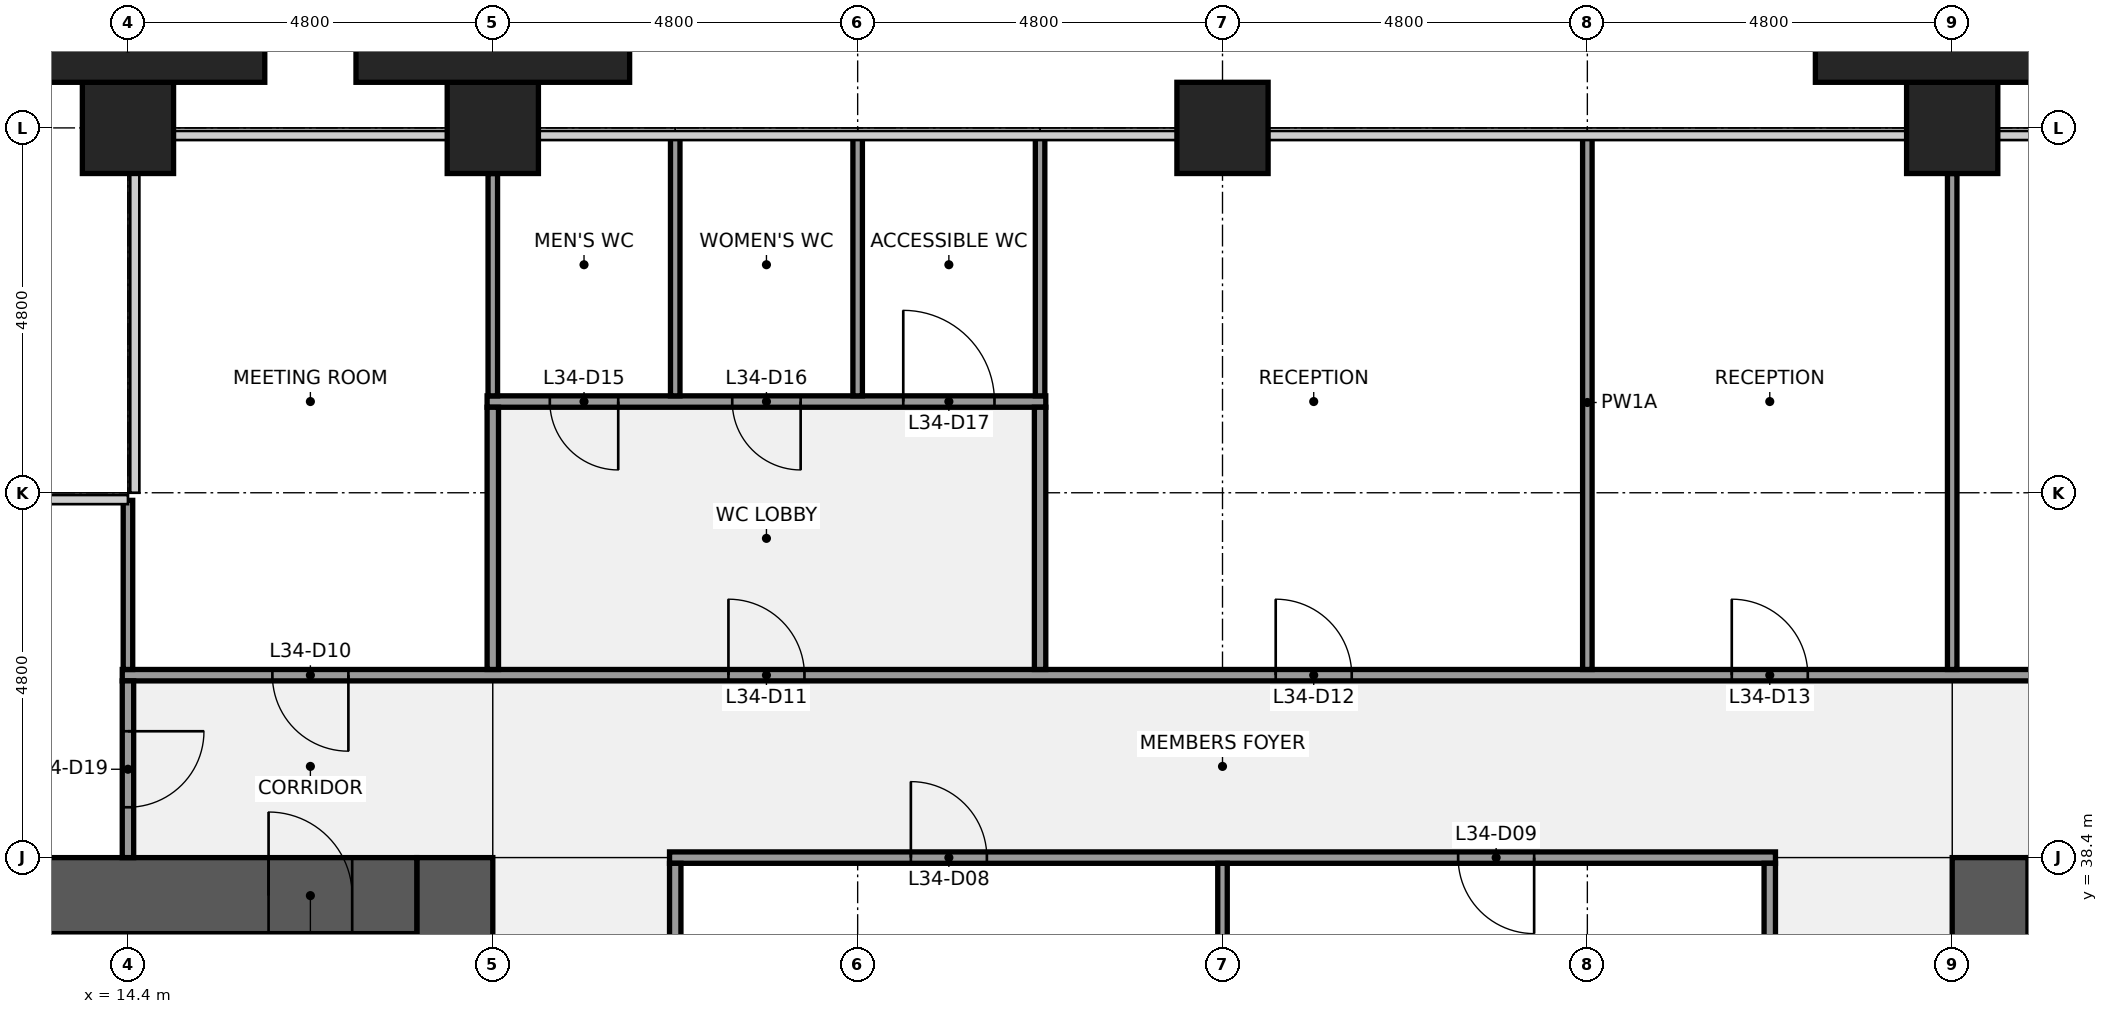
"""IFC4 building model, lengths in metres.
Left out: names, types, materials, properties, quantities, classifications, styles, units other than length and angle.
Written with IfcOpenShell. Run it as: python <this file> out.ifc"""

import sys

from ifc_helpers import new_model, si_unit, direction, frame, frame_2d, origin, origin_2d, place, context, subcontext, project, spatial, rectangle, extrude, element, fill, save


model = new_model("IFC4")
c1 = context("Model", 3, precision=1e-05, world=origin(), true_north=direction((0.0, 1.0)))
c2 = subcontext(c1, "Body", "Model", "MODEL_VIEW")
j1 = project(units=[si_unit("LENGTHUNIT", "METRE"), si_unit("PLANEANGLEUNIT", "RADIAN")], contexts=[c1])
p1 = place(None, origin())
s1 = spatial("IfcSite", under=j1, at=p1, CompositionType="ELEMENT")
p2 = place(p1, origin())
s2 = spatial("IfcBuilding", under=s1, at=p2, CompositionType="ELEMENT")
p3 = place(p2, frame((0.0, 0.0, 156.1)))
s3 = spatial("IfcBuildingStorey", under=s2, at=p3, CompositionType="ELEMENT", Elevation=156.1)
for number, where, z_axis, x_axis in (
    (1, (14.4, 48.0, 0.0), (0.0, 0.0, 1.0), (1.0, 0.0, 0.0)),
    (2, (19.2, 48.0, 0.0), (0.0, 0.0, 1.0), (1.0, 0.0, 0.0)),
    (3, (28.8, 48.0, 0.0), (0.0, 0.0, 1.0), (1.0, 0.0, 0.0)),
    (4, (38.4, 48.0, 0.0), (0.0, 0.0, 1.0), (1.0, 0.0, 0.0)),
):
    element("IfcColumn", number, at=place(p3, frame(where, z_axis=z_axis, x_axis=x_axis)), inside=s3, PredefinedType="COLUMN", context=c2, shape_type="SweptSolid", body=[
        extrude(rectangle(XDim=1.2, YDim=1.2, at=origin_2d()), origin(), (0.0, 0.0, 1.0), 4.0),
    ])
p4 = place(p3, frame((18.7, 38.4, 0.0), z_axis=(0.0, 0.0, 1.0), x_axis=(0.0, -1.0, 0.0)))
e5 = element("IfcWall", 5, at=p4, inside=s3, PredefinedType="SHEAR", context=c2, shape_type="SweptSolid", body=[
    extrude(rectangle(XDim=28.8, YDim=1.0, at=frame_2d((14.4, 0.0))), origin(), (0.0, 0.0, 1.0), 3.84),
])
p5 = place(p4, frame((18.3, 0.0, 0.0)))
e6 = element("IfcOpeningElement", 6, at=p5, cuts=e5, PredefinedType="OPENING", context=c2, shape_type="SweptSolid", body=[
    extrude(rectangle(XDim=1.8, YDim=2.1, at=frame_2d((0.9, 1.05))), frame((0.0, 0.51, 0.0), z_axis=(0.0, -1.0, 0.0), x_axis=(1.0, 0.0, 0.0)), (0.0, 0.0, 1.0), 1.02),
])
p6 = place(p4, frame((8.7, 0.0, 0.0)))
e7 = element("IfcOpeningElement", 7, at=p6, cuts=e5, PredefinedType="OPENING", context=c2, shape_type="SweptSolid", body=[
    extrude(rectangle(XDim=1.8, YDim=2.1, at=frame_2d((0.9, 1.05))), frame((0.0, 0.51, 0.0), z_axis=(0.0, -1.0, 0.0), x_axis=(1.0, 0.0, 0.0)), (0.0, 0.0, 1.0), 1.02),
])
p7 = place(p3, frame((6.25, 37.3, 0.0), z_axis=(0.0, 0.0, 1.0), x_axis=(1.0, 0.0, 0.0)))
e8 = element("IfcWall", 8, at=p7, inside=s3, PredefinedType="SHEAR", context=c2, shape_type="SweptSolid", body=[
    extrude(rectangle(XDim=7.5, YDim=0.2, at=frame_2d((3.75, 0.0))), origin(), (0.0, 0.0, 1.0), 3.84),
])
p8 = place(p3, frame((4.8, 37.9, 0.0), z_axis=(0.0, 0.0, 1.0), x_axis=(1.0, 0.0, 0.0)))
e9 = element("IfcWall", 9, at=p8, inside=s3, PredefinedType="SHEAR", context=c2, shape_type="SweptSolid", body=[
    extrude(rectangle(XDim=13.4, YDim=1.0, at=frame_2d((6.7, 0.0))), origin(), (0.0, 0.0, 1.0), 3.84),
])
p9 = place(p8, frame((11.45, 0.0, 0.0)))
e10 = element("IfcOpeningElement", 10, at=p9, cuts=e9, PredefinedType="OPENING", context=c2, shape_type="SweptSolid", body=[
    extrude(rectangle(XDim=1.1, YDim=2.1, at=frame_2d((0.55, 1.05))), frame((0.0, 0.51, 0.0), z_axis=(0.0, -1.0, 0.0), x_axis=(1.0, 0.0, 0.0)), (0.0, 0.0, 1.0), 1.02),
])
p10 = place(p3, frame((38.9, 9.6, 0.0), z_axis=(0.0, 0.0, 1.0), x_axis=(0.0, 1.0, 0.0)))
e11 = element("IfcWall", 11, at=p10, inside=s3, PredefinedType="SHEAR", context=c2, shape_type="SweptSolid", body=[
    extrude(rectangle(XDim=28.8, YDim=1.0, at=frame_2d((14.4, 0.0))), origin(), (0.0, 0.0, 1.0), 3.84),
])
p11 = place(p10, frame((8.7, 0.0, 0.0)))
e12 = element("IfcOpeningElement", 12, at=p11, cuts=e11, PredefinedType="OPENING", context=c2, shape_type="SweptSolid", body=[
    extrude(rectangle(XDim=1.8, YDim=2.1, at=frame_2d((0.9, 1.05))), frame((0.0, 0.51, 0.0), z_axis=(0.0, -1.0, 0.0), x_axis=(1.0, 0.0, 0.0)), (0.0, 0.0, 1.0), 1.02),
])
p12 = place(p10, frame((18.3, 0.0, 0.0)))
e13 = element("IfcOpeningElement", 13, at=p12, cuts=e11, PredefinedType="OPENING", context=c2, shape_type="SweptSolid", body=[
    extrude(rectangle(XDim=1.8, YDim=2.1, at=frame_2d((0.9, 1.05))), frame((0.0, 0.51, 0.0), z_axis=(0.0, -1.0, 0.0), x_axis=(1.0, 0.0, 0.0)), (0.0, 0.0, 1.0), 1.02),
])
p13 = place(p3, frame((21.525, 38.4, 0.0), z_axis=(0.0, 0.0, 1.0), x_axis=(1.0, 0.0, 0.0)))
e14 = element("IfcWall", 14, at=p13, inside=s3, PredefinedType="PARTITIONING", context=c2, shape_type="SweptSolid", body=[
    extrude(rectangle(XDim=14.55, YDim=0.15, at=frame_2d((7.275, 0.0))), origin(), (0.0, 0.0, 1.0), 2.936),
])
p14 = place(p13, frame((3.175, 0.0, 0.0)))
e15 = element("IfcOpeningElement", 15, at=p14, cuts=e14, PredefinedType="OPENING", context=c2, shape_type="SweptSolid", body=[
    extrude(rectangle(XDim=1.0, YDim=2.1, at=frame_2d((0.5, 1.05))), frame((0.0, 0.085, 0.0), z_axis=(0.0, -1.0, 0.0), x_axis=(1.0, 0.0, 0.0)), (0.0, 0.0, 1.0), 0.17),
])
p15 = place(p13, frame((10.375, 0.0, 0.0)))
e16 = element("IfcOpeningElement", 16, at=p15, cuts=e14, PredefinedType="OPENING", context=c2, shape_type="SweptSolid", body=[
    extrude(rectangle(XDim=1.0, YDim=2.1, at=frame_2d((0.5, 1.05))), frame((0.0, 0.085, 0.0), z_axis=(0.0, -1.0, 0.0), x_axis=(1.0, 0.0, 0.0)), (0.0, 0.0, 1.0), 0.17),
])
p16 = place(p3, frame((14.325, 40.8, 0.0), z_axis=(0.0, 0.0, 1.0), x_axis=(1.0, 0.0, 0.0)))
e17 = element("IfcWall", 17, at=p16, inside=s3, PredefinedType="PARTITIONING", context=c2, shape_type="SweptSolid", body=[
    extrude(rectangle(XDim=28.95, YDim=0.15, at=frame_2d((14.475, 0.0))), origin(), (0.0, 0.0, 1.0), 2.936),
])
p17 = place(p16, frame((1.975, 0.0, 0.0)))
e18 = element("IfcOpeningElement", 18, at=p17, cuts=e17, PredefinedType="OPENING", context=c2, shape_type="SweptSolid", body=[
    extrude(rectangle(XDim=1.0, YDim=2.1, at=frame_2d((0.5, 1.05))), frame((0.0, 0.085, 0.0), z_axis=(0.0, -1.0, 0.0), x_axis=(1.0, 0.0, 0.0)), (0.0, 0.0, 1.0), 0.17),
])
p18 = place(p16, frame((7.975, 0.0, 0.0)))
e19 = element("IfcOpeningElement", 19, at=p18, cuts=e17, PredefinedType="OPENING", context=c2, shape_type="SweptSolid", body=[
    extrude(rectangle(XDim=1.0, YDim=2.1, at=frame_2d((0.5, 1.05))), frame((0.0, 0.085, 0.0), z_axis=(0.0, -1.0, 0.0), x_axis=(1.0, 0.0, 0.0)), (0.0, 0.0, 1.0), 0.17),
])
p19 = place(p16, frame((15.175, 0.0, 0.0)))
e20 = element("IfcOpeningElement", 20, at=p19, cuts=e17, PredefinedType="OPENING", context=c2, shape_type="SweptSolid", body=[
    extrude(rectangle(XDim=1.0, YDim=2.1, at=frame_2d((0.5, 1.05))), frame((0.0, 0.085, 0.0), z_axis=(0.0, -1.0, 0.0), x_axis=(1.0, 0.0, 0.0)), (0.0, 0.0, 1.0), 0.17),
])
p20 = place(p16, frame((21.175, 0.0, 0.0)))
e21 = element("IfcOpeningElement", 21, at=p20, cuts=e17, PredefinedType="OPENING", context=c2, shape_type="SweptSolid", body=[
    extrude(rectangle(XDim=1.0, YDim=2.1, at=frame_2d((0.5, 1.05))), frame((0.0, 0.085, 0.0), z_axis=(0.0, -1.0, 0.0), x_axis=(1.0, 0.0, 0.0)), (0.0, 0.0, 1.0), 0.17),
])
p21 = place(p16, frame((25.975, 0.0, 0.0)))
e22 = element("IfcOpeningElement", 22, at=p21, cuts=e17, PredefinedType="OPENING", context=c2, shape_type="SweptSolid", body=[
    extrude(rectangle(XDim=1.0, YDim=2.1, at=frame_2d((0.5, 1.05))), frame((0.0, 0.085, 0.0), z_axis=(0.0, -1.0, 0.0), x_axis=(1.0, 0.0, 0.0)), (0.0, 0.0, 1.0), 0.17),
])
p22 = place(p3, frame((19.125, 44.4, 0.0), z_axis=(0.0, 0.0, 1.0), x_axis=(1.0, 0.0, 0.0)))
e23 = element("IfcWall", 23, at=p22, inside=s3, PredefinedType="PARTITIONING", context=c2, shape_type="SweptSolid", body=[
    extrude(rectangle(XDim=7.35, YDim=0.15, at=frame_2d((3.675, 0.0))), origin(), (0.0, 0.0, 1.0), 2.936),
])
p23 = place(p22, frame((0.825, 0.0, 0.0)))
e24 = element("IfcOpeningElement", 24, at=p23, cuts=e23, PredefinedType="OPENING", context=c2, shape_type="SweptSolid", body=[
    extrude(rectangle(XDim=0.9, YDim=2.1, at=frame_2d((0.45, 1.05))), frame((0.0, 0.085, 0.0), z_axis=(0.0, -1.0, 0.0), x_axis=(1.0, 0.0, 0.0)), (0.0, 0.0, 1.0), 0.17),
])
p24 = place(p22, frame((3.225, 0.0, 0.0)))
e25 = element("IfcOpeningElement", 25, at=p24, cuts=e23, PredefinedType="OPENING", context=c2, shape_type="SweptSolid", body=[
    extrude(rectangle(XDim=0.9, YDim=2.1, at=frame_2d((0.45, 1.05))), frame((0.0, 0.085, 0.0), z_axis=(0.0, -1.0, 0.0), x_axis=(1.0, 0.0, 0.0)), (0.0, 0.0, 1.0), 0.17),
])
p25 = place(p22, frame((5.475, 0.0, 0.0)))
e26 = element("IfcOpeningElement", 26, at=p25, cuts=e23, PredefinedType="OPENING", context=c2, shape_type="SweptSolid", body=[
    extrude(rectangle(XDim=1.2, YDim=2.1, at=frame_2d((0.6, 1.05))), frame((0.0, 0.085, 0.0), z_axis=(0.0, -1.0, 0.0), x_axis=(1.0, 0.0, 0.0)), (0.0, 0.0, 1.0), 0.17),
])
p26 = place(p3, frame((14.4, 40.875, 0.0), z_axis=(0.0, 0.0, 1.0), x_axis=(0.0, 1.0, 0.0)))
e27 = element("IfcWall", 27, at=p26, inside=s3, PredefinedType="PARTITIONING", context=c2, shape_type="SweptSolid", body=[
    extrude(rectangle(XDim=2.225, YDim=0.125, at=frame_2d((1.113, 0.0))), origin(), (0.0, 0.0, 1.0), 2.936),
])
p27 = place(p3, frame((14.4, 38.4, 0.0), z_axis=(0.0, 0.0, 1.0), x_axis=(0.0, 1.0, 0.0)))
e28 = element("IfcWall", 28, at=p27, inside=s3, PredefinedType="PARTITIONING", context=c2, shape_type="SweptSolid", body=[
    extrude(rectangle(XDim=2.325, YDim=0.15, at=frame_2d((1.163, 0.0))), origin(), (0.0, 0.0, 1.0), 2.936),
])
p28 = place(p27, frame((0.663, 0.0, 0.0)))
e29 = element("IfcOpeningElement", 29, at=p28, cuts=e28, PredefinedType="OPENING", context=c2, shape_type="SweptSolid", body=[
    extrude(rectangle(XDim=1.0, YDim=2.1, at=frame_2d((0.5, 1.05))), frame((0.0, 0.085, 0.0), z_axis=(0.0, -1.0, 0.0), x_axis=(1.0, 0.0, 0.0)), (0.0, 0.0, 1.0), 0.17),
])
p29 = place(p3, frame((19.2, 44.475, 0.0), z_axis=(0.0, 0.0, 1.0), x_axis=(0.0, 1.0, 0.0)))
e30 = element("IfcWall", 30, at=p29, inside=s3, PredefinedType="PARTITIONING", context=c2, shape_type="SweptSolid", body=[
    extrude(rectangle(XDim=2.925, YDim=0.125, at=frame_2d((1.462, 0.0))), origin(), (0.0, 0.0, 1.0), 2.936),
])
p30 = place(p3, frame((19.2, 40.875, 0.0), z_axis=(0.0, 0.0, 1.0), x_axis=(0.0, 1.0, 0.0)))
e31 = element("IfcWall", 31, at=p30, inside=s3, PredefinedType="PARTITIONING", context=c2, shape_type="SweptSolid", body=[
    extrude(rectangle(XDim=3.45, YDim=0.15, at=frame_2d((1.725, 0.0))), origin(), (0.0, 0.0, 1.0), 2.936),
])
p31 = place(p3, frame((21.6, 44.475, 0.0), z_axis=(0.0, 0.0, 1.0), x_axis=(0.0, 1.0, 0.0)))
e32 = element("IfcWall", 32, at=p31, inside=s3, PredefinedType="PARTITIONING", context=c2, shape_type="SweptSolid", body=[
    extrude(rectangle(XDim=3.425, YDim=0.125, at=frame_2d((1.712, 0.0))), origin(), (0.0, 0.0, 1.0), 2.936),
])
p32 = place(p3, frame((21.6, 33.675, 0.0), z_axis=(0.0, 0.0, 1.0), x_axis=(0.0, 1.0, 0.0)))
e33 = element("IfcWall", 33, at=p32, inside=s3, PredefinedType="PARTITIONING", context=c2, shape_type="SweptSolid", body=[
    extrude(rectangle(XDim=4.65, YDim=0.15, at=frame_2d((2.325, 0.0))), origin(), (0.0, 0.0, 1.0), 2.936),
])
for number, where, z_axis, x_axis in (
    (34, (24.0, 44.475, 0.0), (0.0, 0.0, 1.0), (0.0, 1.0, 0.0)),
    (35, (26.4, 44.475, 0.0), (0.0, 0.0, 1.0), (0.0, 1.0, 0.0)),
):
    element("IfcWall", number, at=place(p3, frame(where, z_axis=z_axis, x_axis=x_axis)), inside=s3, PredefinedType="PARTITIONING", context=c2, shape_type="SweptSolid", body=[
        extrude(rectangle(XDim=3.425, YDim=0.125, at=frame_2d((1.712, 0.0))), origin(), (0.0, 0.0, 1.0), 2.936),
    ])
p33 = place(p3, frame((26.4, 40.875, 0.0), z_axis=(0.0, 0.0, 1.0), x_axis=(0.0, 1.0, 0.0)))
e36 = element("IfcWall", 36, at=p33, inside=s3, PredefinedType="PARTITIONING", context=c2, shape_type="SweptSolid", body=[
    extrude(rectangle(XDim=3.45, YDim=0.15, at=frame_2d((1.725, 0.0))), origin(), (0.0, 0.0, 1.0), 2.936),
])
p34 = place(p3, frame((28.8, 33.663, 0.0), z_axis=(0.0, 0.0, 1.0), x_axis=(0.0, 1.0, 0.0)))
e37 = element("IfcWall", 37, at=p34, inside=s3, PredefinedType="PARTITIONING", context=c2, shape_type="SweptSolid", body=[
    extrude(rectangle(XDim=4.662, YDim=0.125, at=frame_2d((2.331, 0.0))), origin(), (0.0, 0.0, 1.0), 2.936),
])
p35 = place(p3, frame((33.6, 40.875, 0.0), z_axis=(0.0, 0.0, 1.0), x_axis=(0.0, 1.0, 0.0)))
e38 = element("IfcWall", 38, at=p35, inside=s3, PredefinedType="PARTITIONING", context=c2, shape_type="SweptSolid", body=[
    extrude(rectangle(XDim=7.025, YDim=0.125, at=frame_2d((3.512, 0.0))), origin(), (0.0, 0.0, 1.0), 2.936),
])
p36 = place(p3, frame((36.0, 33.675, 0.0), z_axis=(0.0, 0.0, 1.0), x_axis=(0.0, 1.0, 0.0)))
e39 = element("IfcWall", 39, at=p36, inside=s3, PredefinedType="PARTITIONING", context=c2, shape_type="SweptSolid", body=[
    extrude(rectangle(XDim=4.65, YDim=0.15, at=frame_2d((2.325, 0.0))), origin(), (0.0, 0.0, 1.0), 2.936),
])
p37 = place(p3, frame((38.4, 40.875, 0.0), z_axis=(0.0, 0.0, 1.0), x_axis=(0.0, 1.0, 0.0)))
e40 = element("IfcWall", 40, at=p37, inside=s3, PredefinedType="PARTITIONING", context=c2, shape_type="SweptSolid", body=[
    extrude(rectangle(XDim=6.525, YDim=0.125, at=frame_2d((3.262, 0.0))), origin(), (0.0, 0.0, 1.0), 2.936),
])
for number, where, z_axis, x_axis in (
    (41, (14.4, 49.05, 0.0), (0.0, 0.0, 1.0), (1.0, 0.0, 0.0)),
    (42, (19.2, 49.05, 0.0), (0.0, 0.0, 1.0), (1.0, 0.0, 0.0)),
    (43, (38.4, 49.05, 0.0), (0.0, 0.0, 1.0), (1.0, 0.0, 0.0)),
):
    element("IfcColumn", number, at=place(p3, frame(where, z_axis=z_axis, x_axis=x_axis)), inside=s3, PredefinedType="PILASTER", context=c2, shape_type="SweptSolid", body=[
        extrude(rectangle(XDim=3.6, YDim=0.9, at=origin_2d()), origin(), (0.0, 0.0, 1.0), 4.0),
    ])
p38 = place(p9, origin())
e44 = element("IfcDoor", 44, at=p38, inside=s3, OperationType="SINGLE_SWING_LEFT", PredefinedType="DOOR", context=c2, shape_type="SweptSolid", body=[
    extrude(rectangle(XDim=1.1, YDim=2.1, at=frame_2d((0.55, 1.05))), frame((0.0, 0.025, 0.0), z_axis=(0.0, -1.0, 0.0), x_axis=(1.0, 0.0, 0.0)), (0.0, 0.0, 1.0), 0.05),
])
fill(e10, e44)
p39 = place(p14, origin())
e45 = element("IfcDoor", 45, at=p39, inside=s3, OperationType="SINGLE_SWING_LEFT", PredefinedType="DOOR", context=c2, shape_type="SweptSolid", body=[
    extrude(rectangle(XDim=1.0, YDim=2.1, at=frame_2d((0.5, 1.05))), frame((0.0, 0.025, 0.0), z_axis=(0.0, -1.0, 0.0), x_axis=(1.0, 0.0, 0.0)), (0.0, 0.0, 1.0), 0.05),
])
fill(e15, e45)
p40 = place(p15, origin())
e46 = element("IfcDoor", 46, at=p40, inside=s3, OperationType="SINGLE_SWING_RIGHT", PredefinedType="DOOR", context=c2, shape_type="SweptSolid", body=[
    extrude(rectangle(XDim=1.0, YDim=2.1, at=frame_2d((0.5, 1.05))), frame((0.0, 0.025, 0.0), z_axis=(0.0, -1.0, 0.0), x_axis=(1.0, 0.0, 0.0)), (0.0, 0.0, 1.0), 0.05),
])
fill(e16, e46)
p41 = place(p17, origin())
e47 = element("IfcDoor", 47, at=p41, inside=s3, OperationType="SINGLE_SWING_RIGHT", PredefinedType="DOOR", context=c2, shape_type="SweptSolid", body=[
    extrude(rectangle(XDim=1.0, YDim=2.1, at=frame_2d((0.5, 1.05))), frame((0.0, 0.025, 0.0), z_axis=(0.0, -1.0, 0.0), x_axis=(1.0, 0.0, 0.0)), (0.0, 0.0, 1.0), 0.05),
])
fill(e18, e47)
p42 = place(p18, origin())
e48 = element("IfcDoor", 48, at=p42, inside=s3, OperationType="SINGLE_SWING_LEFT", PredefinedType="DOOR", context=c2, shape_type="SweptSolid", body=[
    extrude(rectangle(XDim=1.0, YDim=2.1, at=frame_2d((0.5, 1.05))), frame((0.0, 0.025, 0.0), z_axis=(0.0, -1.0, 0.0), x_axis=(1.0, 0.0, 0.0)), (0.0, 0.0, 1.0), 0.05),
])
fill(e19, e48)
p43 = place(p19, origin())
e49 = element("IfcDoor", 49, at=p43, inside=s3, OperationType="SINGLE_SWING_LEFT", PredefinedType="DOOR", context=c2, shape_type="SweptSolid", body=[
    extrude(rectangle(XDim=1.0, YDim=2.1, at=frame_2d((0.5, 1.05))), frame((0.0, 0.025, 0.0), z_axis=(0.0, -1.0, 0.0), x_axis=(1.0, 0.0, 0.0)), (0.0, 0.0, 1.0), 0.05),
])
fill(e20, e49)
p44 = place(p20, origin())
e50 = element("IfcDoor", 50, at=p44, inside=s3, OperationType="SINGLE_SWING_LEFT", PredefinedType="DOOR", context=c2, shape_type="SweptSolid", body=[
    extrude(rectangle(XDim=1.0, YDim=2.1, at=frame_2d((0.5, 1.05))), frame((0.0, 0.025, 0.0), z_axis=(0.0, -1.0, 0.0), x_axis=(1.0, 0.0, 0.0)), (0.0, 0.0, 1.0), 0.05),
])
fill(e21, e50)
p45 = place(p23, origin())
e51 = element("IfcDoor", 51, at=p45, inside=s3, OperationType="SINGLE_SWING_RIGHT", PredefinedType="DOOR", context=c2, shape_type="SweptSolid", body=[
    extrude(rectangle(XDim=0.9, YDim=2.1, at=frame_2d((0.45, 1.05))), frame((0.0, 0.025, 0.0), z_axis=(0.0, -1.0, 0.0), x_axis=(1.0, 0.0, 0.0)), (0.0, 0.0, 1.0), 0.05),
])
fill(e24, e51)
p46 = place(p24, origin())
e52 = element("IfcDoor", 52, at=p46, inside=s3, OperationType="SINGLE_SWING_RIGHT", PredefinedType="DOOR", context=c2, shape_type="SweptSolid", body=[
    extrude(rectangle(XDim=0.9, YDim=2.1, at=frame_2d((0.45, 1.05))), frame((0.0, 0.025, 0.0), z_axis=(0.0, -1.0, 0.0), x_axis=(1.0, 0.0, 0.0)), (0.0, 0.0, 1.0), 0.05),
])
fill(e25, e52)
p47 = place(p25, origin())
e53 = element("IfcDoor", 53, at=p47, inside=s3, OperationType="SINGLE_SWING_LEFT", PredefinedType="DOOR", context=c2, shape_type="SweptSolid", body=[
    extrude(rectangle(XDim=1.2, YDim=2.1, at=frame_2d((0.6, 1.05))), frame((0.0, 0.025, 0.0), z_axis=(0.0, -1.0, 0.0), x_axis=(1.0, 0.0, 0.0)), (0.0, 0.0, 1.0), 0.05),
])
fill(e26, e53)
p48 = place(p28, origin())
e54 = element("IfcDoor", 54, at=p48, inside=s3, OperationType="SINGLE_SWING_RIGHT", PredefinedType="DOOR", context=c2, shape_type="SweptSolid", body=[
    extrude(rectangle(XDim=1.0, YDim=2.1, at=frame_2d((0.5, 1.05))), frame((0.0, 0.025, 0.0), z_axis=(0.0, -1.0, 0.0), x_axis=(1.0, 0.0, 0.0)), (0.0, 0.0, 1.0), 0.05),
])
fill(e29, e54)
save(model, sys.argv[1])
